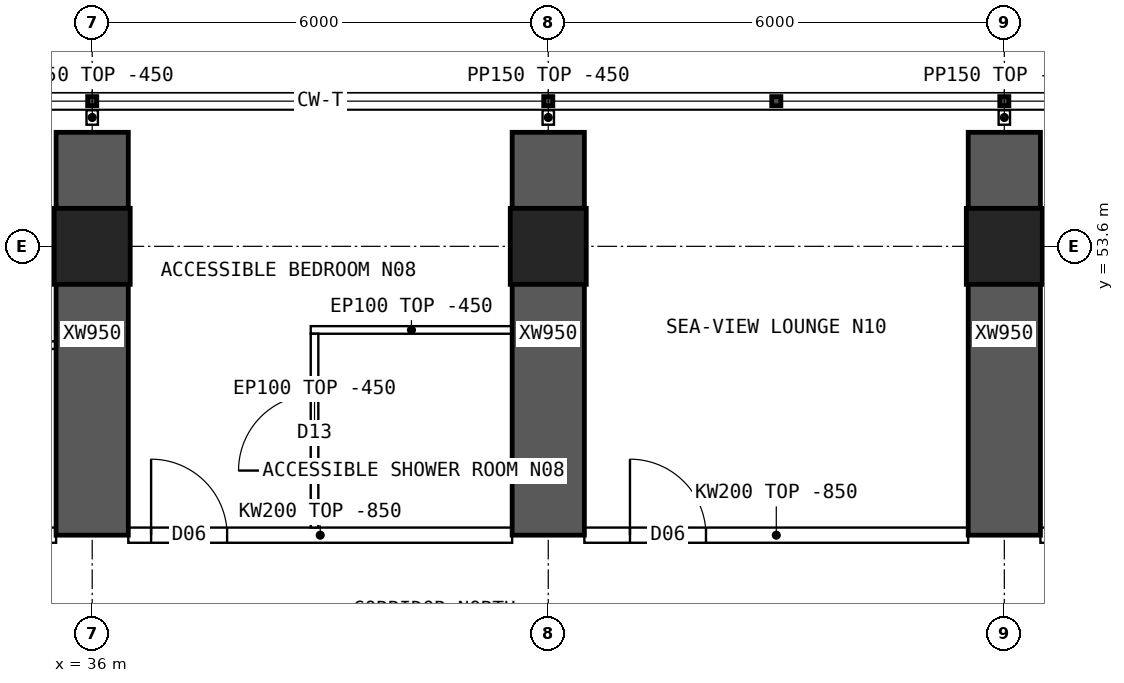
"""IFC4 building model, lengths in metres.
Left out: names, types, materials, properties, quantities, classifications, styles, units other than length and angle.
Written with IfcOpenShell. Run it as: python <this file> out.ifc"""

import sys

from ifc_helpers import new_model, si_unit, direction, frame, frame_2d, origin, origin_2d, place, context, subcontext, project, spatial, polyline, rectangle, hollow_rectangle, outline, extrude, element, fill, save


model = new_model("IFC4")
c1 = context("Model", 3, precision=1e-05, world=origin(), true_north=direction((0.0, 1.0)))
c2 = subcontext(c1, "Body", "Model", "MODEL_VIEW")
j1 = project(units=[si_unit("LENGTHUNIT", "METRE"), si_unit("PLANEANGLEUNIT", "RADIAN")], contexts=[c1])
p1 = place(None, origin())
s1 = spatial("IfcSite", under=j1, at=p1, CompositionType="ELEMENT")
p2 = place(p1, origin())
s2 = spatial("IfcBuilding", under=s1, at=p2, CompositionType="ELEMENT")
p3 = place(p2, frame((0.0, 0.0, 80.65)))
s3 = spatial("IfcBuildingStorey", under=s2, at=p3, CompositionType="ELEMENT", Elevation=80.65)
for number, where, z_axis, x_axis in (
    (1, (36.0, 53.6, 0.0), (0.0, 0.0, 1.0), (1.0, 0.0, 0.0)),
    (2, (42.0, 53.6, 0.0), (0.0, 0.0, 1.0), (1.0, 0.0, 0.0)),
    (3, (48.0, 53.6, 0.0), (0.0, 0.0, 1.0), (1.0, 0.0, 0.0)),
):
    element("IfcColumn", number, at=place(p3, frame(where, z_axis=z_axis, x_axis=x_axis)), inside=s3, PredefinedType="COLUMN", context=c2, shape_type="SweptSolid", body=[
        extrude(hollow_rectangle(XDim=1.0, YDim=1.0, WallThickness=0.1, at=origin_2d()), origin(), (0.0, 0.0, 1.0), 3.75),
    ])
for number, where, z_axis, x_axis in (
    (4, (36.0, 49.8, 0.0), (0.0, 0.0, 1.0), (0.0, 1.0, 0.0)),
    (5, (42.0, 49.8, 0.0), (0.0, 0.0, 1.0), (0.0, 1.0, 0.0)),
    (6, (48.0, 49.8, 0.0), (0.0, 0.0, 1.0), (0.0, 1.0, 0.0)),
):
    element("IfcWall", number, at=place(p3, frame(where, z_axis=z_axis, x_axis=x_axis)), inside=s3, PredefinedType="SHEAR", context=c2, shape_type="SweptSolid", body=[
        extrude(rectangle(XDim=5.3, YDim=0.95, at=frame_2d((2.65, 0.0))), origin(), (0.0, 0.0, 1.0), 3.75),
    ])
p4 = place(p3, frame((30.475, 49.8, 0.0), z_axis=(0.0, 0.0, 1.0), x_axis=(1.0, 0.0, 0.0)))
e7 = element("IfcWall", 7, at=p4, inside=s3, PredefinedType="SOLIDWALL", context=c2, shape_type="SweptSolid", body=[
    extrude(outline(polyline([(0.0, 0.0), (5.05, 0.0), (5.05, 2.9), (0.0, 2.9), (0.0, 0.0)])), frame((0.0, 0.1, 0.0), z_axis=(0.0, -1.0, 0.0), x_axis=(1.0, 0.0, 0.0)), (0.0, 0.0, 1.0), 0.2),
])
p5 = place(p4, frame((1.45, 0.0, 0.0)))
e8 = element("IfcOpeningElement", 8, at=p5, cuts=e7, PredefinedType="OPENING", context=c2, shape_type="SweptSolid", body=[
    extrude(rectangle(XDim=0.9, YDim=2.1, at=frame_2d((0.45, 1.05))), frame((0.0, 0.11, 0.0), z_axis=(0.0, -1.0, 0.0), x_axis=(1.0, 0.0, 0.0)), (0.0, 0.0, 1.0), 0.22),
])
p6 = place(p4, frame((2.7, 0.0, 0.0)))
e9 = element("IfcOpeningElement", 9, at=p6, cuts=e7, PredefinedType="OPENING", context=c2, shape_type="SweptSolid", body=[
    extrude(rectangle(XDim=0.9, YDim=2.1, at=frame_2d((0.45, 1.05))), frame((0.0, 0.11, 0.0), z_axis=(0.0, -1.0, 0.0), x_axis=(1.0, 0.0, 0.0)), (0.0, 0.0, 1.0), 0.22),
])
p7 = place(p3, frame((36.475, 49.8, 0.0), z_axis=(0.0, 0.0, 1.0), x_axis=(1.0, 0.0, 0.0)))
e10 = element("IfcWall", 10, at=p7, inside=s3, PredefinedType="SOLIDWALL", context=c2, shape_type="SweptSolid", body=[
    extrude(outline(polyline([(0.0, 0.0), (5.05, 0.0), (5.05, 2.9), (0.0, 2.9), (0.0, 0.0)])), frame((0.0, 0.1, 0.0), z_axis=(0.0, -1.0, 0.0), x_axis=(1.0, 0.0, 0.0)), (0.0, 0.0, 1.0), 0.2),
])
p8 = place(p7, frame((0.3, 0.0, 0.0)))
e11 = element("IfcOpeningElement", 11, at=p8, cuts=e10, PredefinedType="OPENING", context=c2, shape_type="SweptSolid", body=[
    extrude(rectangle(XDim=1.0, YDim=2.1, at=frame_2d((0.5, 1.05))), frame((0.0, 0.11, 0.0), z_axis=(0.0, -1.0, 0.0), x_axis=(1.0, 0.0, 0.0)), (0.0, 0.0, 1.0), 0.22),
])
p9 = place(p3, frame((42.475, 49.8, 0.0), z_axis=(0.0, 0.0, 1.0), x_axis=(1.0, 0.0, 0.0)))
e12 = element("IfcWall", 12, at=p9, inside=s3, PredefinedType="SOLIDWALL", context=c2, shape_type="SweptSolid", body=[
    extrude(outline(polyline([(0.0, 0.0), (5.05, 0.0), (5.05, 2.9), (0.0, 2.9), (0.0, 0.0)])), frame((0.0, 0.1, 0.0), z_axis=(0.0, -1.0, 0.0), x_axis=(1.0, 0.0, 0.0)), (0.0, 0.0, 1.0), 0.2),
])
p10 = place(p9, frame((0.6, 0.0, 0.0)))
e13 = element("IfcOpeningElement", 13, at=p10, cuts=e12, PredefinedType="OPENING", context=c2, shape_type="SweptSolid", body=[
    extrude(rectangle(XDim=1.0, YDim=2.1, at=frame_2d((0.5, 1.05))), frame((0.0, 0.11, 0.0), z_axis=(0.0, -1.0, 0.0), x_axis=(1.0, 0.0, 0.0)), (0.0, 0.0, 1.0), 0.22),
])
p11 = place(p3, frame((48.475, 49.8, 0.0), z_axis=(0.0, 0.0, 1.0), x_axis=(1.0, 0.0, 0.0)))
e14 = element("IfcWall", 14, at=p11, inside=s3, PredefinedType="SOLIDWALL", context=c2, shape_type="SweptSolid", body=[
    extrude(outline(polyline([(0.0, 0.0), (5.05, 0.0), (5.05, 2.9), (0.0, 2.9), (0.0, 0.0)])), frame((0.0, 0.1, 0.0), z_axis=(0.0, -1.0, 0.0), x_axis=(1.0, 0.0, 0.0)), (0.0, 0.0, 1.0), 0.2),
])
p12 = place(p11, frame((0.6, 0.0, 0.0)))
e15 = element("IfcOpeningElement", 15, at=p12, cuts=e14, PredefinedType="OPENING", context=c2, shape_type="SweptSolid", body=[
    extrude(rectangle(XDim=1.0, YDim=2.1, at=frame_2d((0.5, 1.05))), frame((0.0, 0.11, 0.0), z_axis=(0.0, -1.0, 0.0), x_axis=(1.0, 0.0, 0.0)), (0.0, 0.0, 1.0), 0.22),
])
p13 = place(p3, frame((34.125, 52.3, 0.0), z_axis=(0.0, 0.0, 1.0), x_axis=(1.0, 0.0, 0.0)))
e16 = element("IfcWall", 16, at=p13, inside=s3, PredefinedType="PARTITIONING", context=c2, shape_type="SweptSolid", body=[
    extrude(rectangle(XDim=1.4, YDim=0.1, at=frame_2d((0.7, 0.0))), origin(), (0.0, 0.0, 1.0), 3.3),
])
p14 = place(p13, frame((0.25, 0.0, 0.0)))
e17 = element("IfcOpeningElement", 17, at=p14, cuts=e16, PredefinedType="OPENING", context=c2, shape_type="SweptSolid", body=[
    extrude(rectangle(XDim=0.9, YDim=2.1, at=frame_2d((0.45, 1.05))), frame((0.0, 0.06, 0.0), z_axis=(0.0, -1.0, 0.0), x_axis=(1.0, 0.0, 0.0)), (0.0, 0.0, 1.0), 0.12),
])
p15 = place(p3, frame((38.875, 52.5, 0.0), z_axis=(0.0, 0.0, 1.0), x_axis=(1.0, 0.0, 0.0)))
e18 = element("IfcWall", 18, at=p15, inside=s3, PredefinedType="PARTITIONING", context=c2, shape_type="SweptSolid", body=[
    extrude(rectangle(XDim=2.65, YDim=0.1, at=frame_2d((1.325, 0.0))), origin(), (0.0, 0.0, 1.0), 3.3),
])
p16 = place(p3, frame((38.925, 52.45, 0.0), z_axis=(0.0, 0.0, 1.0), x_axis=(0.0, -1.0, 0.0)))
e19 = element("IfcWall", 19, at=p16, inside=s3, PredefinedType="PARTITIONING", context=c2, shape_type="SweptSolid", body=[
    extrude(outline(polyline([(0.0, 0.0), (2.55, 0.0), (2.55, 2.9), (2.502, 2.9), (2.5, 3.3), (0.0, 3.3), (0.0, 0.0)])), frame((0.0, 0.05, 0.0), z_axis=(0.0, -1.0, 0.0), x_axis=(1.0, 0.0, 0.0)), (0.0, 0.0, 1.0), 0.1),
])
p17 = place(p16, frame((0.8, 0.0, 0.0)))
e20 = element("IfcOpeningElement", 20, at=p17, cuts=e19, PredefinedType="OPENING", context=c2, shape_type="SweptSolid", body=[
    extrude(rectangle(XDim=1.0, YDim=2.1, at=frame_2d((0.5, 1.05))), frame((0.0, 0.06, 0.0), z_axis=(0.0, -1.0, 0.0), x_axis=(1.0, 0.0, 0.0)), (0.0, 0.0, 1.0), 0.12),
])
for number, where, z_axis, x_axis in (
    (21, (36.0, 55.2, 0.0), (0.0, 0.0, 1.0), (0.0, 1.0, 0.0)),
    (22, (42.0, 55.2, 0.0), (0.0, 0.0, 1.0), (0.0, 1.0, 0.0)),
    (23, (48.0, 55.2, 0.0), (0.0, 0.0, 1.0), (0.0, 1.0, 0.0)),
):
    element("IfcWall", number, at=place(p3, frame(where, z_axis=z_axis, x_axis=x_axis)), inside=s3, PredefinedType="PARTITIONING", context=c2, shape_type="SweptSolid", body=[
        extrude(rectangle(XDim=0.19, YDim=0.15, at=frame_2d((0.095, 0.0))), origin(), (0.0, 0.0, 1.0), 3.3),
    ])
p18 = place(p17, origin())
e24 = element("IfcDoor", 24, at=p18, inside=s3, OperationType="SINGLE_SWING_RIGHT", PredefinedType="DOOR", context=c2, shape_type="SweptSolid", body=[
    extrude(rectangle(XDim=1.0, YDim=2.1, at=frame_2d((0.5, 1.05))), frame((0.0, 0.025, 0.0), z_axis=(0.0, -1.0, 0.0), x_axis=(1.0, 0.0, 0.0)), (0.0, 0.0, 1.0), 0.05),
])
fill(e20, e24)
p19 = place(p8, origin())
e25 = element("IfcDoor", 25, at=p19, inside=s3, OperationType="SINGLE_SWING_LEFT", PredefinedType="DOOR", context=c2, shape_type="SweptSolid", body=[
    extrude(rectangle(XDim=1.0, YDim=2.1, at=frame_2d((0.5, 1.05))), frame((0.0, 0.025, 0.0), z_axis=(0.0, -1.0, 0.0), x_axis=(1.0, 0.0, 0.0)), (0.0, 0.0, 1.0), 0.05),
])
fill(e11, e25)
p20 = place(p10, origin())
e26 = element("IfcDoor", 26, at=p20, inside=s3, OperationType="SINGLE_SWING_LEFT", PredefinedType="DOOR", context=c2, shape_type="SweptSolid", body=[
    extrude(rectangle(XDim=1.0, YDim=2.1, at=frame_2d((0.5, 1.05))), frame((0.0, 0.025, 0.0), z_axis=(0.0, -1.0, 0.0), x_axis=(1.0, 0.0, 0.0)), (0.0, 0.0, 1.0), 0.05),
])
fill(e13, e26)
save(model, sys.argv[1])
